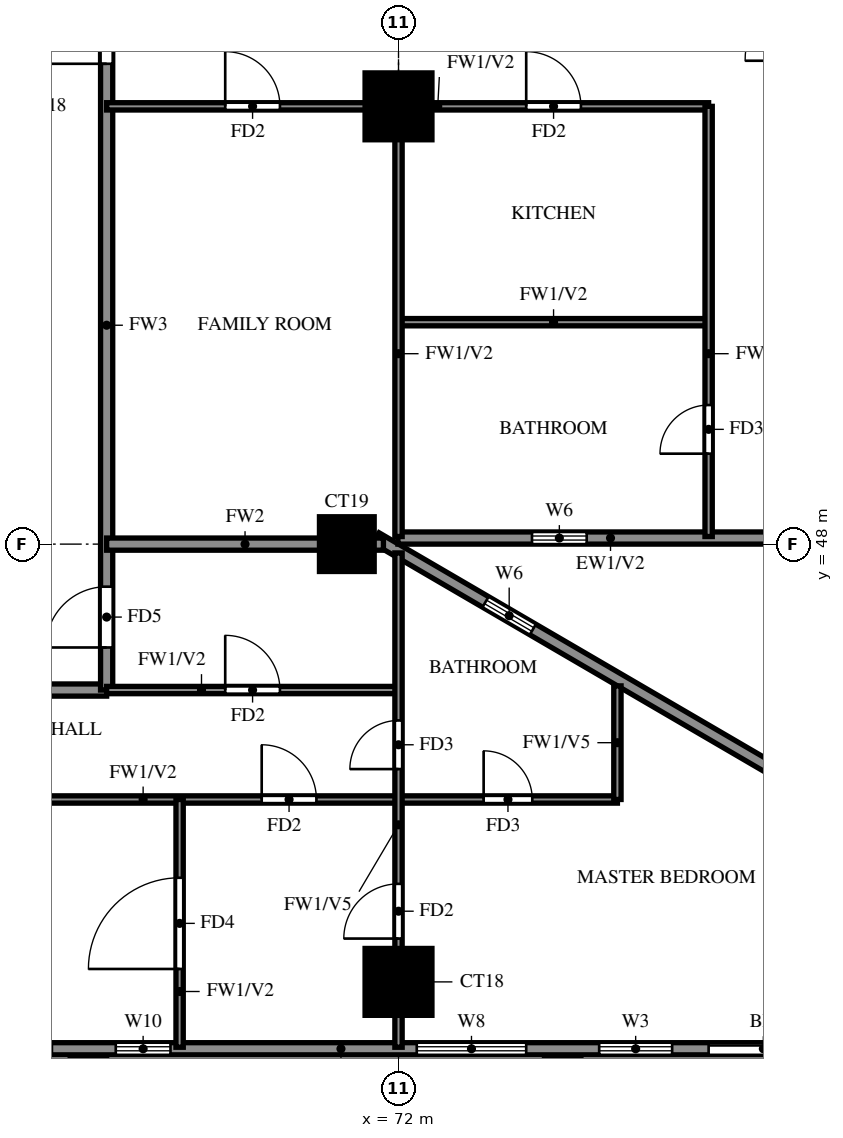
"""IFC4 building model, lengths in metres.
Left out: names, types, materials, properties, quantities, classifications, styles, units other than length and angle.
Written with IfcOpenShell. Run it as: python <this file> out.ifc"""

import sys

from ifc_helpers import new_model, si_unit, direction, frame, frame_2d, origin, origin_2d, place, context, subcontext, project, spatial, rectangle, extrude, source, transform, mapped, element, fill, save


model = new_model("IFC4")
c1 = context("Model", 3, precision=1e-05, world=origin(), true_north=direction((0.0, 1.0)))
c2 = subcontext(c1, "Body", "Model", "MODEL_VIEW")
j1 = project(units=[si_unit("LENGTHUNIT", "METRE"), si_unit("PLANEANGLEUNIT", "RADIAN")], contexts=[c1])
p1 = place(None, origin())
s1 = spatial("IfcSite", under=j1, at=p1, CompositionType="ELEMENT")
p2 = place(p1, origin())
s2 = spatial("IfcBuilding", under=s1, at=p2, CompositionType="ELEMENT")
p3 = place(p2, frame((0.0, 0.0, 130.5)))
s3 = spatial("IfcBuildingStorey", under=s2, at=p3, CompositionType="ELEMENT", Elevation=130.5)
m1 = source(origin(), c2, "Body", "SweptSolid", [
    extrude(rectangle(XDim=1.1, YDim=1.1, at=origin_2d()), origin(), (0.0, 0.0, 1.0), 3.2),
])
p4 = place(p3, frame((72.0, 40.8, 0.0), z_axis=(0.0, 0.0, 1.0), x_axis=(1.0, 0.0, 0.0)))
e1 = element("IfcColumn", 1, at=p4, inside=s3, PredefinedType="COLUMN", context=c2, shape_type="MappedRepresentation", body=[
    mapped(m1, transform((0.0, 0.0, 0.0))),
])
m2 = source(origin(), c2, "Body", "SweptSolid", [
    extrude(rectangle(XDim=0.9, YDim=0.9, at=origin_2d()), origin(), (0.0, 0.0, 1.0), 3.2),
])
p5 = place(p3, frame((71.15, 48.0, 0.0), z_axis=(0.0, 0.0, 1.0), x_axis=(1.0, 0.0, 0.0)))
e2 = element("IfcColumn", 2, at=p5, inside=s3, PredefinedType="COLUMN", context=c2, shape_type="MappedRepresentation", body=[
    mapped(m2, transform((0.0, 0.0, 0.0))),
])
p6 = place(p3, frame((72.0, 55.2, 0.0), z_axis=(0.0, 0.0, 1.0), x_axis=(1.0, 0.0, 0.0)))
e3 = element("IfcColumn", 3, at=p6, inside=s3, PredefinedType="COLUMN", context=c2, shape_type="MappedRepresentation", body=[
    mapped(m1, transform((0.0, 0.0, 0.0))),
])
p7 = place(p3, frame((85.719, 39.881, 0.0), z_axis=(0.0, 0.0, 1.0), x_axis=(-0.86377618652, 0.503875678716, 0.0)))
e4 = element("IfcWall", 4, at=p7, inside=s3, PredefinedType="SOLIDWALL", context=c2, shape_type="SweptSolid", body=[
    extrude(rectangle(XDim=16.311, YDim=0.2, at=frame_2d((8.156, 0.0))), origin(), (0.0, 0.0, 1.0), 3.2),
])
p8 = place(p7, frame((13.326, 0.0, 1.5)))
e5 = element("IfcOpeningElement", 5, at=p8, cuts=e4, PredefinedType="OPENING", context=c2, shape_type="SweptSolid", body=[
    extrude(rectangle(XDim=0.9, YDim=0.9, at=frame_2d((0.45, 0.45))), frame((0.0, 0.11, 0.0), z_axis=(0.0, -1.0, 0.0), x_axis=(1.0, 0.0, 0.0)), (0.0, 0.0, 1.0), 0.22),
])
p9 = place(p3, frame((71.99, 48.1, 0.0), z_axis=(0.0, 0.0, 1.0), x_axis=(1.0, 0.0, 0.0)))
e6 = element("IfcWall", 6, at=p9, inside=s3, PredefinedType="SOLIDWALL", context=c2, shape_type="SweptSolid", body=[
    extrude(rectangle(XDim=6.66, YDim=0.2, at=frame_2d((3.33, 0.0))), origin(), (0.0, 0.0, 1.0), 3.2),
])
p10 = place(p9, frame((2.205, 0.0, 1.5)))
e7 = element("IfcOpeningElement", 7, at=p10, cuts=e6, PredefinedType="OPENING", context=c2, shape_type="SweptSolid", body=[
    extrude(rectangle(XDim=0.9, YDim=0.9, at=frame_2d((0.45, 0.45))), frame((0.0, 0.11, 0.0), z_axis=(0.0, -1.0, 0.0), x_axis=(1.0, 0.0, 0.0)), (0.0, 0.0, 1.0), 0.22),
])
p11 = place(p3, frame((58.8, 39.7, 0.0), z_axis=(0.0, 0.0, 1.0), x_axis=(1.0, 0.0, 0.0)))
e8 = element("IfcWall", 8, at=p11, inside=s3, PredefinedType="SOLIDWALL", context=c2, shape_type="SweptSolid", body=[
    extrude(rectangle(XDim=27.23, YDim=0.2, at=frame_2d((13.615, 0.0))), origin(), (0.0, 0.0, 1.0), 3.2),
])
p12 = place(p11, frame((3.3, 0.0, 0.0)))
e9 = element("IfcOpeningElement", 9, at=p12, cuts=e8, PredefinedType="OPENING", context=c2, shape_type="SweptSolid", body=[
    extrude(rectangle(XDim=1.8, YDim=2.4, at=frame_2d((0.9, 1.2))), frame((0.0, 0.11, 0.0), z_axis=(0.0, -1.0, 0.0), x_axis=(1.0, 0.0, 0.0)), (0.0, 0.0, 1.0), 0.22),
])
p13 = place(p11, frame((18.3, 0.0, 0.0)))
e10 = element("IfcOpeningElement", 10, at=p13, cuts=e8, PredefinedType="OPENING", context=c2, shape_type="SweptSolid", body=[
    extrude(rectangle(XDim=1.8, YDim=2.4, at=frame_2d((0.9, 1.2))), frame((0.0, 0.11, 0.0), z_axis=(0.0, -1.0, 0.0), x_axis=(1.0, 0.0, 0.0)), (0.0, 0.0, 1.0), 0.22),
])
p14 = place(p11, frame((1.95, 0.0, 0.6)))
e11 = element("IfcOpeningElement", 11, at=p14, cuts=e8, PredefinedType="OPENING", context=c2, shape_type="SweptSolid", body=[
    extrude(rectangle(XDim=0.9, YDim=2.4, at=frame_2d((0.45, 1.2))), frame((0.0, 0.11, 0.0), z_axis=(0.0, -1.0, 0.0), x_axis=(1.0, 0.0, 0.0)), (0.0, 0.0, 1.0), 0.22),
])
p15 = place(p11, frame((5.7, 0.0, 0.6)))
e12 = element("IfcOpeningElement", 12, at=p15, cuts=e8, PredefinedType="OPENING", context=c2, shape_type="SweptSolid", body=[
    extrude(rectangle(XDim=1.8, YDim=2.4, at=frame_2d((0.9, 1.2))), frame((0.0, 0.11, 0.0), z_axis=(0.0, -1.0, 0.0), x_axis=(1.0, 0.0, 0.0)), (0.0, 0.0, 1.0), 0.22),
])
p16 = place(p11, frame((8.55, 0.0, 0.6)))
e13 = element("IfcOpeningElement", 13, at=p16, cuts=e8, PredefinedType="OPENING", context=c2, shape_type="SweptSolid", body=[
    extrude(rectangle(XDim=0.9, YDim=2.4, at=frame_2d((0.45, 1.2))), frame((0.0, 0.11, 0.0), z_axis=(0.0, -1.0, 0.0), x_axis=(1.0, 0.0, 0.0)), (0.0, 0.0, 1.0), 0.22),
])
p17 = place(p11, frame((13.5, 0.0, 0.6)))
e14 = element("IfcOpeningElement", 14, at=p17, cuts=e8, PredefinedType="OPENING", context=c2, shape_type="SweptSolid", body=[
    extrude(rectangle(XDim=1.8, YDim=2.4, at=frame_2d((0.9, 1.2))), frame((0.0, 0.11, 0.0), z_axis=(0.0, -1.0, 0.0), x_axis=(1.0, 0.0, 0.0)), (0.0, 0.0, 1.0), 0.22),
])
p18 = place(p11, frame((16.5, 0.0, 0.6)))
e15 = element("IfcOpeningElement", 15, at=p18, cuts=e8, PredefinedType="OPENING", context=c2, shape_type="SweptSolid", body=[
    extrude(rectangle(XDim=1.2, YDim=2.4, at=frame_2d((0.6, 1.2))), frame((0.0, 0.11, 0.0), z_axis=(0.0, -1.0, 0.0), x_axis=(1.0, 0.0, 0.0)), (0.0, 0.0, 1.0), 0.22),
])
p19 = place(p11, frame((20.7, 0.0, 0.6)))
e16 = element("IfcOpeningElement", 16, at=p19, cuts=e8, PredefinedType="OPENING", context=c2, shape_type="SweptSolid", body=[
    extrude(rectangle(XDim=1.2, YDim=2.4, at=frame_2d((0.6, 1.2))), frame((0.0, 0.11, 0.0), z_axis=(0.0, -1.0, 0.0), x_axis=(1.0, 0.0, 0.0)), (0.0, 0.0, 1.0), 0.22),
])
p20 = place(p11, frame((23.038, 0.0, 0.6)))
e17 = element("IfcOpeningElement", 17, at=p20, cuts=e8, PredefinedType="OPENING", context=c2, shape_type="SweptSolid", body=[
    extrude(rectangle(XDim=1.8, YDim=2.4, at=frame_2d((0.9, 1.2))), frame((0.0, 0.11, 0.0), z_axis=(0.0, -1.0, 0.0), x_axis=(1.0, 0.0, 0.0)), (0.0, 0.0, 1.0), 0.22),
])
p21 = place(p11, frame((26.003, 0.0, 0.6)))
e18 = element("IfcOpeningElement", 18, at=p21, cuts=e8, PredefinedType="OPENING", context=c2, shape_type="SweptSolid", body=[
    extrude(rectangle(XDim=0.9, YDim=2.4, at=frame_2d((0.45, 1.2))), frame((0.0, 0.11, 0.0), z_axis=(0.0, -1.0, 0.0), x_axis=(1.0, 0.0, 0.0)), (0.0, 0.0, 1.0), 0.22),
])
p22 = place(p3, frame((60.0, 45.6, 0.0), z_axis=(0.0, 0.0, 1.0), x_axis=(1.0, 0.0, 0.0)))
e19 = element("IfcWall", 19, at=p22, inside=s3, PredefinedType="SOLIDWALL", context=c2, shape_type="SweptSolid", body=[
    extrude(rectangle(XDim=7.2, YDim=0.2, at=frame_2d((3.6, 0.0))), origin(), (0.0, 0.0, 1.0), 3.2),
])
p23 = place(p3, frame((67.2, 45.6, 0.0), z_axis=(0.0, 0.0, 1.0), x_axis=(0.0, 1.0, 0.0)))
e20 = element("IfcWall", 20, at=p23, inside=s3, PredefinedType="SOLIDWALL", context=c2, shape_type="SweptSolid", body=[
    extrude(rectangle(XDim=12.0, YDim=0.2, at=frame_2d((6.0, 0.0))), origin(), (0.0, 0.0, 1.0), 3.2),
])
p24 = place(p23, frame((10.3, 0.0, 0.0)))
e21 = element("IfcOpeningElement", 21, at=p24, cuts=e20, PredefinedType="OPENING", context=c2, shape_type="SweptSolid", body=[
    extrude(rectangle(XDim=1.0, YDim=2.1, at=frame_2d((0.5, 1.05))), frame((0.0, 0.11, 0.0), z_axis=(0.0, -1.0, 0.0), x_axis=(1.0, 0.0, 0.0)), (0.0, 0.0, 1.0), 0.22),
])
p25 = place(p23, frame((0.7, 0.0, 0.0)))
e22 = element("IfcOpeningElement", 22, at=p25, cuts=e20, PredefinedType="OPENING", context=c2, shape_type="SweptSolid", body=[
    extrude(rectangle(XDim=1.0, YDim=2.1, at=frame_2d((0.5, 1.05))), frame((0.0, 0.11, 0.0), z_axis=(0.0, -1.0, 0.0), x_axis=(1.0, 0.0, 0.0)), (0.0, 0.0, 1.0), 0.22),
])
p26 = place(p3, frame((67.2, 48.0, 0.0), z_axis=(0.0, 0.0, 1.0), x_axis=(1.0, 0.0, 0.0)))
e23 = element("IfcWall", 23, at=p26, inside=s3, PredefinedType="SOLIDWALL", context=c2, shape_type="SweptSolid", body=[
    extrude(rectangle(XDim=4.552, YDim=0.2, at=frame_2d((2.276, 0.0))), origin(), (0.0, 0.0, 1.0), 3.2),
])
p27 = place(p3, frame((60.0, 43.8, 0.0), z_axis=(0.0, 0.0, 1.0), x_axis=(1.0, 0.0, 0.0)))
e24 = element("IfcWall", 24, at=p27, inside=s3, PredefinedType="PARTITIONING", context=c2, shape_type="SweptSolid", body=[
    extrude(rectangle(XDim=15.6, YDim=0.12, at=frame_2d((7.8, 0.0))), origin(), (0.0, 0.0, 1.0), 3.2),
])
p28 = place(p27, frame((9.75, 0.0, 0.0)))
e25 = element("IfcOpeningElement", 25, at=p28, cuts=e24, PredefinedType="OPENING", context=c2, shape_type="SweptSolid", body=[
    extrude(rectangle(XDim=0.9, YDim=2.1, at=frame_2d((0.45, 1.05))), frame((0.0, 0.07, 0.0), z_axis=(0.0, -1.0, 0.0), x_axis=(1.0, 0.0, 0.0)), (0.0, 0.0, 1.0), 0.14),
])
p29 = place(p27, frame((3.45, 0.0, 0.0)))
e26 = element("IfcOpeningElement", 26, at=p29, cuts=e24, PredefinedType="OPENING", context=c2, shape_type="SweptSolid", body=[
    extrude(rectangle(XDim=1.5, YDim=2.1, at=frame_2d((0.75, 1.05))), frame((0.0, 0.07, 0.0), z_axis=(0.0, -1.0, 0.0), x_axis=(1.0, 0.0, 0.0)), (0.0, 0.0, 1.0), 0.14),
])
p30 = place(p27, frame((13.4, 0.0, 0.0)))
e27 = element("IfcOpeningElement", 27, at=p30, cuts=e24, PredefinedType="OPENING", context=c2, shape_type="SweptSolid", body=[
    extrude(rectangle(XDim=0.8, YDim=2.1, at=frame_2d((0.4, 1.05))), frame((0.0, 0.07, 0.0), z_axis=(0.0, -1.0, 0.0), x_axis=(1.0, 0.0, 0.0)), (0.0, 0.0, 1.0), 0.14),
])
p31 = place(p3, frame((67.2, 45.6, 0.0), z_axis=(0.0, 0.0, 1.0), x_axis=(1.0, 0.0, 0.0)))
e28 = element("IfcWall", 28, at=p31, inside=s3, PredefinedType="PARTITIONING", context=c2, shape_type="SweptSolid", body=[
    extrude(rectangle(XDim=4.8, YDim=0.12, at=frame_2d((2.4, 0.0))), origin(), (0.0, 0.0, 1.0), 3.2),
])
p32 = place(p31, frame((1.95, 0.0, 0.0)))
e29 = element("IfcOpeningElement", 29, at=p32, cuts=e28, PredefinedType="OPENING", context=c2, shape_type="SweptSolid", body=[
    extrude(rectangle(XDim=0.9, YDim=2.1, at=frame_2d((0.45, 1.05))), frame((0.0, 0.07, 0.0), z_axis=(0.0, -1.0, 0.0), x_axis=(1.0, 0.0, 0.0)), (0.0, 0.0, 1.0), 0.14),
])
p33 = place(p3, frame((72.0, 51.65, 0.0), z_axis=(0.0, 0.0, 1.0), x_axis=(1.0, 0.0, 0.0)))
e30 = element("IfcWall", 30, at=p33, inside=s3, PredefinedType="PARTITIONING", context=c2, shape_type="SweptSolid", body=[
    extrude(rectangle(XDim=5.1, YDim=0.12, at=frame_2d((2.55, 0.0))), origin(), (0.0, 0.0, 1.0), 3.2),
])
p34 = place(p3, frame((67.2, 55.2, 0.0), z_axis=(0.0, 0.0, 1.0), x_axis=(1.0, 0.0, 0.0)))
e31 = element("IfcWall", 31, at=p34, inside=s3, PredefinedType="PARTITIONING", context=c2, shape_type="SweptSolid", body=[
    extrude(rectangle(XDim=9.9, YDim=0.12, at=frame_2d((4.95, 0.0))), origin(), (0.0, 0.0, 1.0), 3.2),
])
p35 = place(p34, frame((6.9, 0.0, 0.0)))
e32 = element("IfcOpeningElement", 32, at=p35, cuts=e31, PredefinedType="OPENING", context=c2, shape_type="SweptSolid", body=[
    extrude(rectangle(XDim=0.9, YDim=2.1, at=frame_2d((0.45, 1.05))), frame((0.0, 0.07, 0.0), z_axis=(0.0, -1.0, 0.0), x_axis=(1.0, 0.0, 0.0)), (0.0, 0.0, 1.0), 0.14),
])
p36 = place(p34, frame((1.95, 0.0, 0.0)))
e33 = element("IfcOpeningElement", 33, at=p36, cuts=e31, PredefinedType="OPENING", context=c2, shape_type="SweptSolid", body=[
    extrude(rectangle(XDim=0.9, YDim=2.1, at=frame_2d((0.45, 1.05))), frame((0.0, 0.07, 0.0), z_axis=(0.0, -1.0, 0.0), x_axis=(1.0, 0.0, 0.0)), (0.0, 0.0, 1.0), 0.14),
])
p37 = place(p3, frame((68.4, 39.725, 0.0), z_axis=(0.0, 0.0, 1.0), x_axis=(0.0, 1.0, 0.0)))
e34 = element("IfcWall", 34, at=p37, inside=s3, PredefinedType="PARTITIONING", context=c2, shape_type="SweptSolid", body=[
    extrude(rectangle(XDim=4.075, YDim=0.12, at=frame_2d((2.038, 0.0))), origin(), (0.0, 0.0, 1.0), 3.2),
])
p38 = place(p37, frame((1.288, 0.0, 0.0)))
e35 = element("IfcOpeningElement", 35, at=p38, cuts=e34, PredefinedType="OPENING", context=c2, shape_type="SweptSolid", body=[
    extrude(rectangle(XDim=1.5, YDim=2.1, at=frame_2d((0.75, 1.05))), frame((0.0, 0.07, 0.0), z_axis=(0.0, -1.0, 0.0), x_axis=(1.0, 0.0, 0.0)), (0.0, 0.0, 1.0), 0.14),
])
p39 = place(p3, frame((72.0, 39.725, 0.0), z_axis=(0.0, 0.0, 1.0), x_axis=(0.0, 1.0, 0.0)))
e36 = element("IfcWall", 36, at=p39, inside=s3, PredefinedType="PARTITIONING", context=c2, shape_type="SweptSolid", body=[
    extrude(rectangle(XDim=8.13, YDim=0.12, at=frame_2d((4.065, 0.0))), origin(), (0.0, 0.0, 1.0), 2.3),
])
p40 = place(p39, frame((1.788, 0.0, 0.0)))
e37 = element("IfcOpeningElement", 37, at=p40, cuts=e36, PredefinedType="OPENING", context=c2, shape_type="SweptSolid", body=[
    extrude(rectangle(XDim=0.9, YDim=2.1, at=frame_2d((0.45, 1.05))), frame((0.0, 0.07, 0.0), z_axis=(0.0, -1.0, 0.0), x_axis=(1.0, 0.0, 0.0)), (0.0, 0.0, 1.0), 0.14),
])
p41 = place(p39, frame((4.575, 0.0, 0.0)))
e38 = element("IfcOpeningElement", 38, at=p41, cuts=e36, PredefinedType="OPENING", context=c2, shape_type="SweptSolid", body=[
    extrude(rectangle(XDim=0.8, YDim=2.1, at=frame_2d((0.4, 1.05))), frame((0.0, 0.07, 0.0), z_axis=(0.0, -1.0, 0.0), x_axis=(1.0, 0.0, 0.0)), (0.0, 0.0, 1.0), 0.14),
])
p42 = place(p3, frame((72.0, 48.125, 0.0), z_axis=(0.0, 0.0, 1.0), x_axis=(0.0, 1.0, 0.0)))
e39 = element("IfcWall", 39, at=p42, inside=s3, PredefinedType="PARTITIONING", context=c2, shape_type="SweptSolid", body=[
    extrude(rectangle(XDim=7.075, YDim=0.12, at=frame_2d((3.538, 0.0))), origin(), (0.0, 0.0, 1.0), 3.2),
])
p43 = place(p3, frame((75.6, 43.8, 0.0), z_axis=(0.0, 0.0, 1.0), x_axis=(0.0, 1.0, 0.0)))
e40 = element("IfcWall", 40, at=p43, inside=s3, PredefinedType="PARTITIONING", context=c2, shape_type="SweptSolid", body=[
    extrude(rectangle(XDim=1.868, YDim=0.12, at=frame_2d((0.934, 0.0))), origin(), (0.0, 0.0, 1.0), 2.3),
])
p44 = place(p3, frame((77.1, 48.125, 0.0), z_axis=(0.0, 0.0, 1.0), x_axis=(0.0, 1.0, 0.0)))
e41 = element("IfcWall", 41, at=p44, inside=s3, PredefinedType="PARTITIONING", context=c2, shape_type="SweptSolid", body=[
    extrude(rectangle(XDim=7.075, YDim=0.12, at=frame_2d((3.538, 0.0))), origin(), (0.0, 0.0, 1.0), 3.2),
])
p45 = place(p44, frame((1.363, 0.0, 0.0)))
e42 = element("IfcOpeningElement", 42, at=p45, cuts=e41, PredefinedType="OPENING", context=c2, shape_type="SweptSolid", body=[
    extrude(rectangle(XDim=0.8, YDim=2.1, at=frame_2d((0.4, 1.05))), frame((0.0, 0.07, 0.0), z_axis=(0.0, -1.0, 0.0), x_axis=(1.0, 0.0, 0.0)), (0.0, 0.0, 1.0), 0.14),
])
p46 = place(p8, origin())
e43 = element("IfcWindow", 43, at=p46, inside=s3, PartitioningType="SINGLE_PANEL", PredefinedType="WINDOW", context=c2, shape_type="SweptSolid", body=[
    extrude(rectangle(XDim=0.9, YDim=0.9, at=frame_2d((0.45, 0.45))), frame((0.0, 0.03, 0.0), z_axis=(0.0, -1.0, 0.0), x_axis=(1.0, 0.0, 0.0)), (0.0, 0.0, 1.0), 0.06),
])
fill(e5, e43)
p47 = place(p10, origin())
e44 = element("IfcWindow", 44, at=p47, inside=s3, PartitioningType="SINGLE_PANEL", PredefinedType="WINDOW", context=c2, shape_type="SweptSolid", body=[
    extrude(rectangle(XDim=0.9, YDim=0.9, at=frame_2d((0.45, 0.45))), frame((0.0, 0.03, 0.0), z_axis=(0.0, -1.0, 0.0), x_axis=(1.0, 0.0, 0.0)), (0.0, 0.0, 1.0), 0.06),
])
fill(e7, e44)
p48 = place(p13, origin())
e45 = element("IfcDoor", 45, at=p48, inside=s3, OperationType="DOUBLE_DOOR_SLIDING", PredefinedType="DOOR", context=c2, shape_type="SweptSolid", body=[
    extrude(rectangle(XDim=1.8, YDim=2.4, at=frame_2d((0.9, 1.2))), frame((0.0, 0.025, 0.0), z_axis=(0.0, -1.0, 0.0), x_axis=(1.0, 0.0, 0.0)), (0.0, 0.0, 1.0), 0.05),
])
fill(e10, e45)
p49 = place(p16, origin())
e46 = element("IfcWindow", 46, at=p49, inside=s3, PartitioningType="SINGLE_PANEL", PredefinedType="WINDOW", context=c2, shape_type="SweptSolid", body=[
    extrude(rectangle(XDim=0.9, YDim=2.4, at=frame_2d((0.45, 1.2))), frame((0.0, 0.03, 0.0), z_axis=(0.0, -1.0, 0.0), x_axis=(1.0, 0.0, 0.0)), (0.0, 0.0, 1.0), 0.06),
])
fill(e13, e46)
p50 = place(p17, origin())
e47 = element("IfcWindow", 47, at=p50, inside=s3, PartitioningType="DOUBLE_PANEL_VERTICAL", PredefinedType="WINDOW", context=c2, shape_type="SweptSolid", body=[
    extrude(rectangle(XDim=1.8, YDim=2.4, at=frame_2d((0.9, 1.2))), frame((0.0, 0.03, 0.0), z_axis=(0.0, -1.0, 0.0), x_axis=(1.0, 0.0, 0.0)), (0.0, 0.0, 1.0), 0.06),
])
fill(e14, e47)
p51 = place(p18, origin())
e48 = element("IfcWindow", 48, at=p51, inside=s3, PartitioningType="SINGLE_PANEL", PredefinedType="WINDOW", context=c2, shape_type="SweptSolid", body=[
    extrude(rectangle(XDim=1.2, YDim=2.4, at=frame_2d((0.6, 1.2))), frame((0.0, 0.03, 0.0), z_axis=(0.0, -1.0, 0.0), x_axis=(1.0, 0.0, 0.0)), (0.0, 0.0, 1.0), 0.06),
])
fill(e15, e48)
p52 = place(p24, origin())
e49 = element("IfcDoor", 49, at=p52, inside=s3, OperationType="SINGLE_SWING_LEFT", PredefinedType="DOOR", context=c2, shape_type="SweptSolid", body=[
    extrude(rectangle(XDim=1.0, YDim=2.1, at=frame_2d((0.5, 1.05))), frame((0.0, 0.025, 0.0), z_axis=(0.0, -1.0, 0.0), x_axis=(1.0, 0.0, 0.0)), (0.0, 0.0, 1.0), 0.05),
])
fill(e21, e49)
p53 = place(p45, origin())
e50 = element("IfcDoor", 50, at=p53, inside=s3, OperationType="SINGLE_SWING_LEFT", PredefinedType="DOOR", context=c2, shape_type="SweptSolid", body=[
    extrude(rectangle(XDim=0.8, YDim=2.1, at=frame_2d((0.4, 1.05))), frame((0.0, 0.025, 0.0), z_axis=(0.0, -1.0, 0.0), x_axis=(1.0, 0.0, 0.0)), (0.0, 0.0, 1.0), 0.05),
])
fill(e42, e50)
p54 = place(p35, origin())
e51 = element("IfcDoor", 51, at=p54, inside=s3, OperationType="SINGLE_SWING_RIGHT", PredefinedType="DOOR", context=c2, shape_type="SweptSolid", body=[
    extrude(rectangle(XDim=0.9, YDim=2.1, at=frame_2d((0.45, 1.05))), frame((0.0, 0.025, 0.0), z_axis=(0.0, -1.0, 0.0), x_axis=(1.0, 0.0, 0.0)), (0.0, 0.0, 1.0), 0.05),
])
fill(e32, e51)
p55 = place(p36, origin())
e52 = element("IfcDoor", 52, at=p55, inside=s3, OperationType="SINGLE_SWING_LEFT", PredefinedType="DOOR", context=c2, shape_type="SweptSolid", body=[
    extrude(rectangle(XDim=0.9, YDim=2.1, at=frame_2d((0.45, 1.05))), frame((0.0, 0.025, 0.0), z_axis=(0.0, -1.0, 0.0), x_axis=(1.0, 0.0, 0.0)), (0.0, 0.0, 1.0), 0.05),
])
fill(e33, e52)
p56 = place(p38, origin())
e53 = element("IfcDoor", 53, at=p56, inside=s3, OperationType="SINGLE_SWING_RIGHT", PredefinedType="DOOR", context=c2, shape_type="SweptSolid", body=[
    extrude(rectangle(XDim=1.5, YDim=2.1, at=frame_2d((0.75, 1.05))), frame((0.0, 0.025, 0.0), z_axis=(0.0, -1.0, 0.0), x_axis=(1.0, 0.0, 0.0)), (0.0, 0.0, 1.0), 0.05),
])
fill(e35, e53)
p57 = place(p32, origin())
e54 = element("IfcDoor", 54, at=p57, inside=s3, OperationType="SINGLE_SWING_LEFT", PredefinedType="DOOR", context=c2, shape_type="SweptSolid", body=[
    extrude(rectangle(XDim=0.9, YDim=2.1, at=frame_2d((0.45, 1.05))), frame((0.0, 0.025, 0.0), z_axis=(0.0, -1.0, 0.0), x_axis=(1.0, 0.0, 0.0)), (0.0, 0.0, 1.0), 0.05),
])
fill(e29, e54)
p58 = place(p25, origin())
e55 = element("IfcDoor", 55, at=p58, inside=s3, OperationType="SINGLE_SWING_LEFT", PredefinedType="DOOR", context=c2, shape_type="SweptSolid", body=[
    extrude(rectangle(XDim=1.0, YDim=2.1, at=frame_2d((0.5, 1.05))), frame((0.0, 0.025, 0.0), z_axis=(0.0, -1.0, 0.0), x_axis=(1.0, 0.0, 0.0)), (0.0, 0.0, 1.0), 0.05),
])
fill(e22, e55)
p59 = place(p28, origin())
e56 = element("IfcDoor", 56, at=p59, inside=s3, OperationType="SINGLE_SWING_RIGHT", PredefinedType="DOOR", context=c2, shape_type="SweptSolid", body=[
    extrude(rectangle(XDim=0.9, YDim=2.1, at=frame_2d((0.45, 1.05))), frame((0.0, 0.025, 0.0), z_axis=(0.0, -1.0, 0.0), x_axis=(1.0, 0.0, 0.0)), (0.0, 0.0, 1.0), 0.05),
])
fill(e25, e56)
p60 = place(p40, origin())
e57 = element("IfcDoor", 57, at=p60, inside=s3, OperationType="SINGLE_SWING_RIGHT", PredefinedType="DOOR", context=c2, shape_type="SweptSolid", body=[
    extrude(rectangle(XDim=0.9, YDim=2.1, at=frame_2d((0.45, 1.05))), frame((0.0, 0.025, 0.0), z_axis=(0.0, -1.0, 0.0), x_axis=(1.0, 0.0, 0.0)), (0.0, 0.0, 1.0), 0.05),
])
fill(e37, e57)
p61 = place(p41, origin())
e58 = element("IfcDoor", 58, at=p61, inside=s3, OperationType="SINGLE_SWING_RIGHT", PredefinedType="DOOR", context=c2, shape_type="SweptSolid", body=[
    extrude(rectangle(XDim=0.8, YDim=2.1, at=frame_2d((0.4, 1.05))), frame((0.0, 0.025, 0.0), z_axis=(0.0, -1.0, 0.0), x_axis=(1.0, 0.0, 0.0)), (0.0, 0.0, 1.0), 0.05),
])
fill(e38, e58)
p62 = place(p30, origin())
e59 = element("IfcDoor", 59, at=p62, inside=s3, OperationType="SINGLE_SWING_LEFT", PredefinedType="DOOR", context=c2, shape_type="SweptSolid", body=[
    extrude(rectangle(XDim=0.8, YDim=2.1, at=frame_2d((0.4, 1.05))), frame((0.0, 0.025, 0.0), z_axis=(0.0, -1.0, 0.0), x_axis=(1.0, 0.0, 0.0)), (0.0, 0.0, 1.0), 0.05),
])
fill(e27, e59)
save(model, sys.argv[1])
